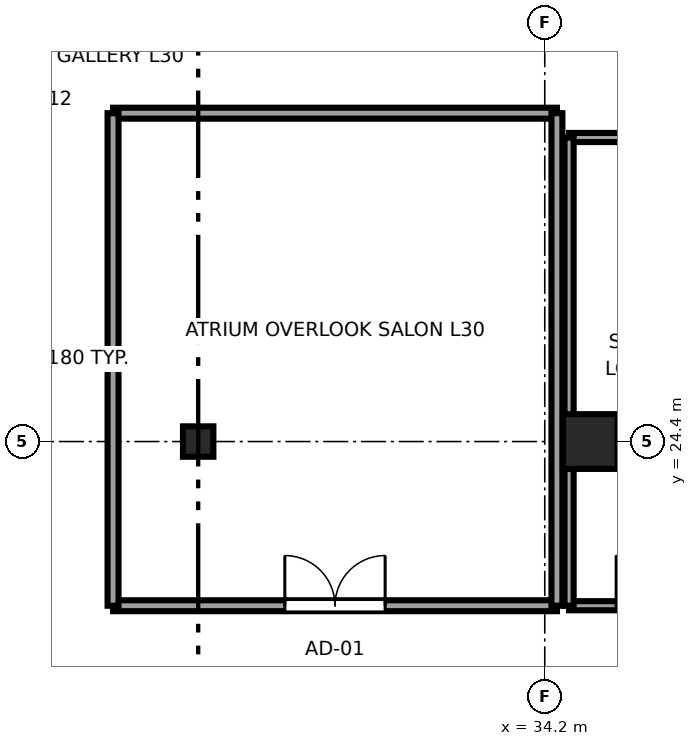
"""IFC4 building model, lengths in metres.
Left out: names, types, materials, properties, quantities, classifications, styles, units other than length and angle.
Written with IfcOpenShell. Run it as: python <this file> out.ifc"""

import sys

from ifc_helpers import new_model, si_unit, direction, frame, frame_2d, origin, origin_2d, place, context, subcontext, project, spatial, rectangle, i_section, extrude, source, transform, mapped, element, fill, save


model = new_model("IFC4")
c1 = context("Model", 3, precision=1e-05, world=origin(), true_north=direction((0.0, 1.0)))
c2 = subcontext(c1, "Body", "Model", "MODEL_VIEW")
j1 = project(units=[si_unit("LENGTHUNIT", "METRE"), si_unit("PLANEANGLEUNIT", "RADIAN")], contexts=[c1])
p1 = place(None, origin())
s1 = spatial("IfcSite", under=j1, at=p1, CompositionType="ELEMENT")
p2 = place(p1, origin())
s2 = spatial("IfcBuilding", under=s1, at=p2, CompositionType="ELEMENT")
p3 = place(p2, frame((0.0, 0.0, 118.65)))
s3 = spatial("IfcBuildingStorey", under=s2, at=p3, CompositionType="ELEMENT", Elevation=118.65)
m1 = source(origin(), c2, "Body", "SweptSolid", [
    extrude(rectangle(XDim=0.9, YDim=0.9, at=origin_2d()), origin(), (0.0, 0.0, 1.0), 3.55),
])
p4 = place(p3, frame((34.95, 24.4, 0.0), z_axis=(0.0, 0.0, 1.0), x_axis=(1.0, 0.0, 0.0)))
e1 = element("IfcColumn", 1, at=p4, inside=s3, PredefinedType="COLUMN", context=c2, shape_type="MappedRepresentation", body=[
    mapped(m1, transform((0.0, 0.0, 0.0), x_axis=(1.0, 0.0, 0.0), y_axis=(0.0, 1.0, 0.0), z_axis=(0.0, 0.0, 1.0), scale=1.0)),
])
m2 = source(origin(), c2, "Body", "SweptSolid", [
    extrude(i_section(OverallWidth=0.5, OverallDepth=0.5, WebThickness=0.022, FlangeThickness=0.034, at=origin_2d()), origin(), (0.0, 0.0, 1.0), 3.55),
])
p5 = place(p3, frame((28.5, 24.4, 0.0), z_axis=(0.0, 0.0, 1.0), x_axis=(1.0, 0.0, 0.0)))
e2 = element("IfcColumn", 2, at=p5, inside=s3, PredefinedType="COLUMN", context=c2, shape_type="MappedRepresentation", body=[
    mapped(m2, transform((0.0, 0.0, 0.0), x_axis=(1.0, 0.0, 0.0), y_axis=(0.0, 1.0, 0.0), z_axis=(0.0, 0.0, 1.0), scale=1.0)),
])
p6 = place(p3, frame((27.1, 21.7, 0.0), z_axis=(0.0, 0.0, 1.0), x_axis=(1.0, 0.0, 0.0)))
e3 = element("IfcWall", 3, at=p6, inside=s3, PredefinedType="PARTITIONING", context=c2, shape_type="SweptSolid", body=[
    extrude(rectangle(XDim=7.3, YDim=0.18, at=frame_2d((3.65, 0.0))), origin(), (0.0, 0.0, 1.0), 3.37),
])
p7 = place(p6, frame((2.825, 0.0, 0.0)))
e4 = element("IfcOpeningElement", 4, at=p7, cuts=e3, PredefinedType="OPENING", context=c2, shape_type="SweptSolid", body=[
    extrude(rectangle(XDim=1.65, YDim=2.15, at=frame_2d((0.825, 1.075))), frame((0.0, 0.1, 0.0), z_axis=(0.0, -1.0, 0.0), x_axis=(1.0, 0.0, 0.0)), (0.0, 0.0, 1.0), 0.2),
])
p8 = place(p3, frame((27.1, 29.8, 0.0), z_axis=(0.0, 0.0, 1.0), x_axis=(1.0, 0.0, 0.0)))
e5 = element("IfcWall", 5, at=p8, inside=s3, PredefinedType="PARTITIONING", context=c2, shape_type="SweptSolid", body=[
    extrude(rectangle(XDim=7.3, YDim=0.18, at=frame_2d((3.65, 0.0))), origin(), (0.0, 0.0, 1.0), 3.37),
])
for number, where, z_axis, x_axis in (
    (6, (27.1, 21.7, 0.0), (0.0, 0.0, 1.0), (0.0, 1.0, 0.0)),
    (7, (34.4, 21.7, 0.0), (0.0, 0.0, 1.0), (0.0, 1.0, 0.0)),
):
    element("IfcWall", number, at=place(p3, frame(where, z_axis=z_axis, x_axis=x_axis)), inside=s3, PredefinedType="PARTITIONING", context=c2, shape_type="SweptSolid", body=[
        extrude(rectangle(XDim=8.1, YDim=0.18, at=frame_2d((4.05, 0.0))), origin(), (0.0, 0.0, 1.0), 3.37),
    ])
p9 = place(p3, frame((34.6, 21.7, 0.0), z_axis=(0.0, 0.0, 1.0), x_axis=(1.0, 0.0, 0.0)))
e8 = element("IfcWall", 8, at=p9, inside=s3, PredefinedType="PARTITIONING", context=c2, shape_type="SweptSolid", body=[
    extrude(rectangle(XDim=3.2, YDim=0.15, at=frame_2d((1.6, 0.0))), origin(), (0.0, 0.0, 1.0), 3.37),
])
p10 = place(p9, frame((0.775, 0.0, 0.0)))
e9 = element("IfcOpeningElement", 9, at=p10, cuts=e8, PredefinedType="OPENING", context=c2, shape_type="SweptSolid", body=[
    extrude(rectangle(XDim=1.65, YDim=2.15, at=frame_2d((0.825, 1.075))), frame((0.0, 0.085, 0.0), z_axis=(0.0, -1.0, 0.0), x_axis=(1.0, 0.0, 0.0)), (0.0, 0.0, 1.0), 0.17),
])
p11 = place(p3, frame((34.6, 29.4, 0.0), z_axis=(0.0, 0.0, 1.0), x_axis=(1.0, 0.0, 0.0)))
e10 = element("IfcWall", 10, at=p11, inside=s3, PredefinedType="PARTITIONING", context=c2, shape_type="SweptSolid", body=[
    extrude(rectangle(XDim=3.2, YDim=0.15, at=frame_2d((1.6, 0.0))), origin(), (0.0, 0.0, 1.0), 3.37),
])
p12 = place(p3, frame((34.6, 21.7, 0.0), z_axis=(0.0, 0.0, 1.0), x_axis=(0.0, 1.0, 0.0)))
e11 = element("IfcWall", 11, at=p12, inside=s3, PredefinedType="PARTITIONING", context=c2, shape_type="SweptSolid", body=[
    extrude(rectangle(XDim=7.7, YDim=0.15, at=frame_2d((3.85, 0.0))), origin(), (0.0, 0.0, 1.0), 3.37),
])
m3 = source(origin(), c2, "Body", "SweptSolid", [
    extrude(rectangle(XDim=1.65, YDim=2.15, at=frame_2d((0.825, 1.075))), frame((0.0, 0.025, 0.0), z_axis=(0.0, -1.0, 0.0), x_axis=(1.0, 0.0, 0.0)), (0.0, 0.0, 1.0), 0.05),
])
p13 = place(p7, origin())
e12 = element("IfcDoor", 12, at=p13, inside=s3, OperationType="DOUBLE_DOOR_SINGLE_SWING", PredefinedType="DOOR", context=c2, shape_type="MappedRepresentation", body=[
    mapped(m3, transform((0.0, 0.0, 0.0), x_axis=(1.0, 0.0, 0.0), y_axis=(0.0, 1.0, 0.0), z_axis=(0.0, 0.0, 1.0), scale=1.0)),
])
fill(e4, e12)
p14 = place(p10, origin())
e13 = element("IfcDoor", 13, at=p14, inside=s3, OperationType="DOUBLE_DOOR_SINGLE_SWING", PredefinedType="DOOR", context=c2, shape_type="MappedRepresentation", body=[
    mapped(m3, transform((0.0, 0.0, 0.0), x_axis=(1.0, 0.0, 0.0), y_axis=(0.0, 1.0, 0.0), z_axis=(0.0, 0.0, 1.0), scale=1.0)),
])
fill(e9, e13)
save(model, sys.argv[1])
